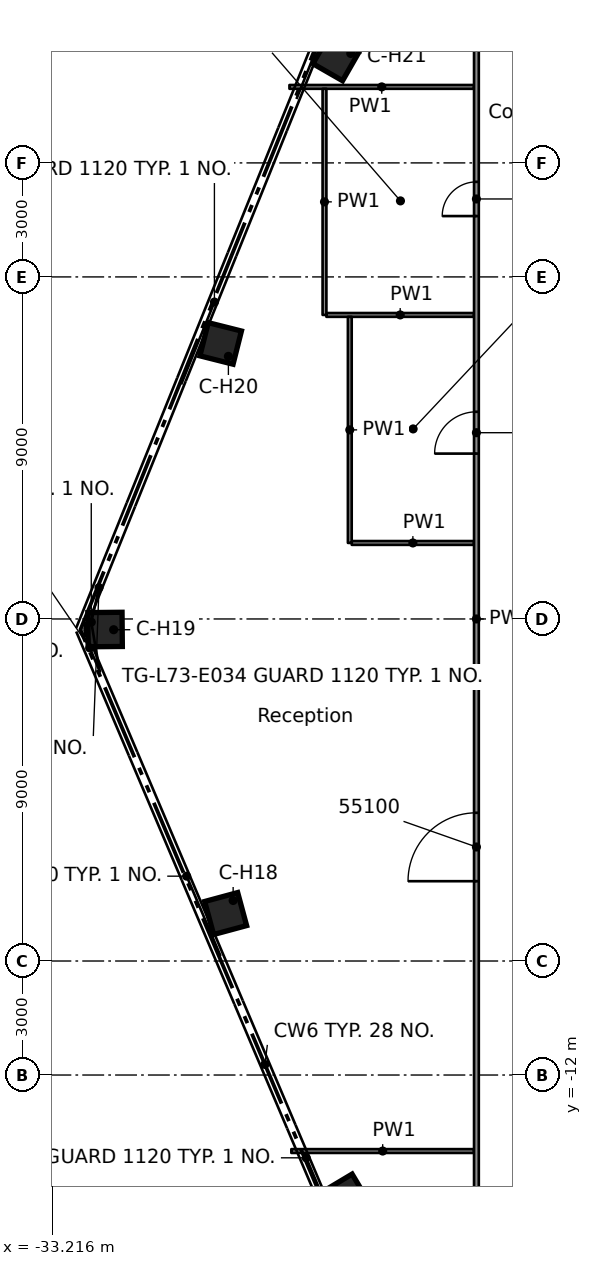
"""IFC4 building model, lengths in metres.
Left out: names, types, materials, properties, quantities, classifications, styles, units other than length and angle.
Written with IfcOpenShell. Run it as: python <this file> out.ifc"""

import sys

from ifc_helpers import new_model, si_unit, direction, frame, frame_2d, origin, origin_2d, place, context, subcontext, project, spatial, rectangle, extrude, element, fill, save


model = new_model("IFC4")
c1 = context("Model", 3, precision=1e-05, world=origin(), true_north=direction((0.0, 1.0)))
c2 = subcontext(c1, "Body", "Model", "MODEL_VIEW")
j1 = project(units=[si_unit("LENGTHUNIT", "METRE"), si_unit("PLANEANGLEUNIT", "RADIAN")], contexts=[c1])
p1 = place(None, origin())
s1 = spatial("IfcSite", under=j1, at=p1, CompositionType="ELEMENT")
p2 = place(p1, origin())
s2 = spatial("IfcBuilding", under=s1, at=p2, CompositionType="ELEMENT")
p3 = place(p2, frame((0.0, 0.0, 275.4)))
s3 = spatial("IfcBuildingStorey", under=s2, at=p3, CompositionType="ELEMENT", Elevation=275.4)
for number, where, z_axis, x_axis in (
    (1, (-25.477, -15.224, 0.0), (0.0, 0.0, 1.0), (-0.858, -0.513, 0.0)),
    (2, (-28.649, -7.751, 0.0), (0.0, 0.0, 1.0), (-0.965, -0.261, 0.0)),
    (3, (-31.821, -0.278, 0.0), (0.0, 0.0, 1.0), (-1.0, -0.009, 0.0)),
    (4, (-28.78, 7.25, 0.0), (0.0, 0.0, 1.0), (-0.97, 0.244, 0.0)),
    (5, (-25.739, 14.777, 0.0), (0.0, 0.0, 1.0), (-0.867, 0.498, 0.0)),
):
    element("IfcColumn", number, at=place(p3, frame(where, z_axis=z_axis, x_axis=x_axis)), inside=s3, PredefinedType="COLUMN", context=c2, shape_type="SweptSolid", body=[
        extrude(rectangle(XDim=0.9, YDim=0.9, at=origin_2d()), origin(), (0.0, 0.0, 1.0), 3.5),
    ])
p4 = place(p3, frame((-26.92, -14.0, 0.0), z_axis=(0.0, 0.0, 1.0), x_axis=(1.0, 0.0, 0.0)))
e6 = element("IfcWall", 6, at=p4, inside=s3, PredefinedType="PARTITIONING", context=c2, shape_type="SweptSolid", body=[
    extrude(rectangle(XDim=4.807, YDim=0.1, at=frame_2d((2.403, 0.0))), origin(), (0.0, 0.0, 1.0), 3.08),
])
p5 = place(p3, frame((-25.331, 2.0, 0.0), z_axis=(0.0, 0.0, 1.0), x_axis=(1.0, 0.0, 0.0)))
e7 = element("IfcWall", 7, at=p5, inside=s3, PredefinedType="PARTITIONING", context=c2, shape_type="SweptSolid", body=[
    extrude(rectangle(XDim=3.218, YDim=0.1, at=frame_2d((1.609, 0.0))), origin(), (0.0, 0.0, 1.0), 3.08),
])
p6 = place(p3, frame((-25.998, 8.0, 0.0), z_axis=(0.0, 0.0, 1.0), x_axis=(1.0, 0.0, 0.0)))
e8 = element("IfcWall", 8, at=p6, inside=s3, PredefinedType="PARTITIONING", context=c2, shape_type="SweptSolid", body=[
    extrude(rectangle(XDim=3.885, YDim=0.1, at=frame_2d((1.942, 0.0))), origin(), (0.0, 0.0, 1.0), 3.08),
])
p7 = place(p3, frame((-26.97, 14.0, 0.0), z_axis=(0.0, 0.0, 1.0), x_axis=(1.0, 0.0, 0.0)))
e9 = element("IfcWall", 9, at=p7, inside=s3, PredefinedType="PARTITIONING", context=c2, shape_type="SweptSolid", body=[
    extrude(rectangle(XDim=4.857, YDim=0.1, at=frame_2d((2.428, 0.0))), origin(), (0.0, 0.0, 1.0), 3.08),
])
p8 = place(p3, frame((-22.05, -15.051, 0.0), z_axis=(0.0, 0.0, 1.0), x_axis=(0.0, 1.0, 0.0)))
e10 = element("IfcWall", 10, at=p8, inside=s3, PredefinedType="PARTITIONING", context=c2, shape_type="SweptSolid", body=[
    extrude(rectangle(XDim=30.102, YDim=0.125, at=frame_2d((15.051, 0.0))), origin(), (0.0, 0.0, 1.0), 3.08),
])
p9 = place(p8, frame((8.151, 0.0, 0.0)))
e11 = element("IfcOpeningElement", 11, at=p9, cuts=e10, PredefinedType="OPENING", context=c2, shape_type="SweptSolid", body=[
    extrude(rectangle(XDim=1.8, YDim=2.1, at=frame_2d((0.9, 1.05))), frame((0.0, 0.073, 0.0), z_axis=(0.0, -1.0, 0.0), x_axis=(1.0, 0.0, 0.0)), (0.0, 0.0, 1.0), 0.145),
])
p10 = place(p8, frame((25.652, 0.0, 0.0)))
e12 = element("IfcOpeningElement", 12, at=p10, cuts=e10, PredefinedType="OPENING", context=c2, shape_type="SweptSolid", body=[
    extrude(rectangle(XDim=0.9, YDim=2.1, at=frame_2d((0.45, 1.05))), frame((0.0, 0.073, 0.0), z_axis=(0.0, -1.0, 0.0), x_axis=(1.0, 0.0, 0.0)), (0.0, 0.0, 1.0), 0.145),
])
p11 = place(p8, frame((19.402, 0.0, 0.0)))
e13 = element("IfcOpeningElement", 13, at=p11, cuts=e10, PredefinedType="OPENING", context=c2, shape_type="SweptSolid", body=[
    extrude(rectangle(XDim=1.1, YDim=2.1, at=frame_2d((0.55, 1.05))), frame((0.0, 0.073, 0.0), z_axis=(0.0, -1.0, 0.0), x_axis=(1.0, 0.0, 0.0)), (0.0, 0.0, 1.0), 0.145),
])
p12 = place(p3, frame((-25.382, 2.001, 0.0), z_axis=(0.0, 0.0, 1.0), x_axis=(0.0, 1.0, 0.0)))
e14 = element("IfcWall", 14, at=p12, inside=s3, PredefinedType="PARTITIONING", context=c2, shape_type="SweptSolid", body=[
    extrude(rectangle(XDim=5.949, YDim=0.1, at=frame_2d((2.975, 0.0))), origin(), (0.0, 0.0, 1.0), 3.08),
])
p13 = place(p3, frame((-26.048, 8.0, 0.0), z_axis=(0.0, 0.0, 1.0), x_axis=(0.0, 1.0, 0.0)))
e15 = element("IfcWall", 15, at=p13, inside=s3, PredefinedType="PARTITIONING", context=c2, shape_type="SweptSolid", body=[
    extrude(rectangle(XDim=5.95, YDim=0.1, at=frame_2d((2.975, 0.0))), origin(), (0.0, 0.0, 1.0), 3.08),
])
p14 = place(p9, origin())
e16 = element("IfcDoor", 16, at=p14, inside=s3, OperationType="DOUBLE_DOOR_SINGLE_SWING", PredefinedType="DOOR", context=c2, shape_type="SweptSolid", body=[
    extrude(rectangle(XDim=1.8, YDim=2.1, at=frame_2d((0.9, 1.05))), frame((0.0, 0.025, 0.0), z_axis=(0.0, -1.0, 0.0), x_axis=(1.0, 0.0, 0.0)), (0.0, 0.0, 1.0), 0.05),
])
fill(e11, e16)
p15 = place(p10, origin())
e17 = element("IfcDoor", 17, at=p15, inside=s3, OperationType="SINGLE_SWING_RIGHT", PredefinedType="DOOR", context=c2, shape_type="SweptSolid", body=[
    extrude(rectangle(XDim=0.9, YDim=2.1, at=frame_2d((0.45, 1.05))), frame((0.0, 0.025, 0.0), z_axis=(0.0, -1.0, 0.0), x_axis=(1.0, 0.0, 0.0)), (0.0, 0.0, 1.0), 0.05),
])
fill(e12, e17)
p16 = place(p11, origin())
e18 = element("IfcDoor", 18, at=p16, inside=s3, OperationType="SINGLE_SWING_RIGHT", PredefinedType="DOOR", context=c2, shape_type="SweptSolid", body=[
    extrude(rectangle(XDim=1.1, YDim=2.1, at=frame_2d((0.55, 1.05))), frame((0.0, 0.025, 0.0), z_axis=(0.0, -1.0, 0.0), x_axis=(1.0, 0.0, 0.0)), (0.0, 0.0, 1.0), 0.05),
])
fill(e13, e18)
save(model, sys.argv[1])
